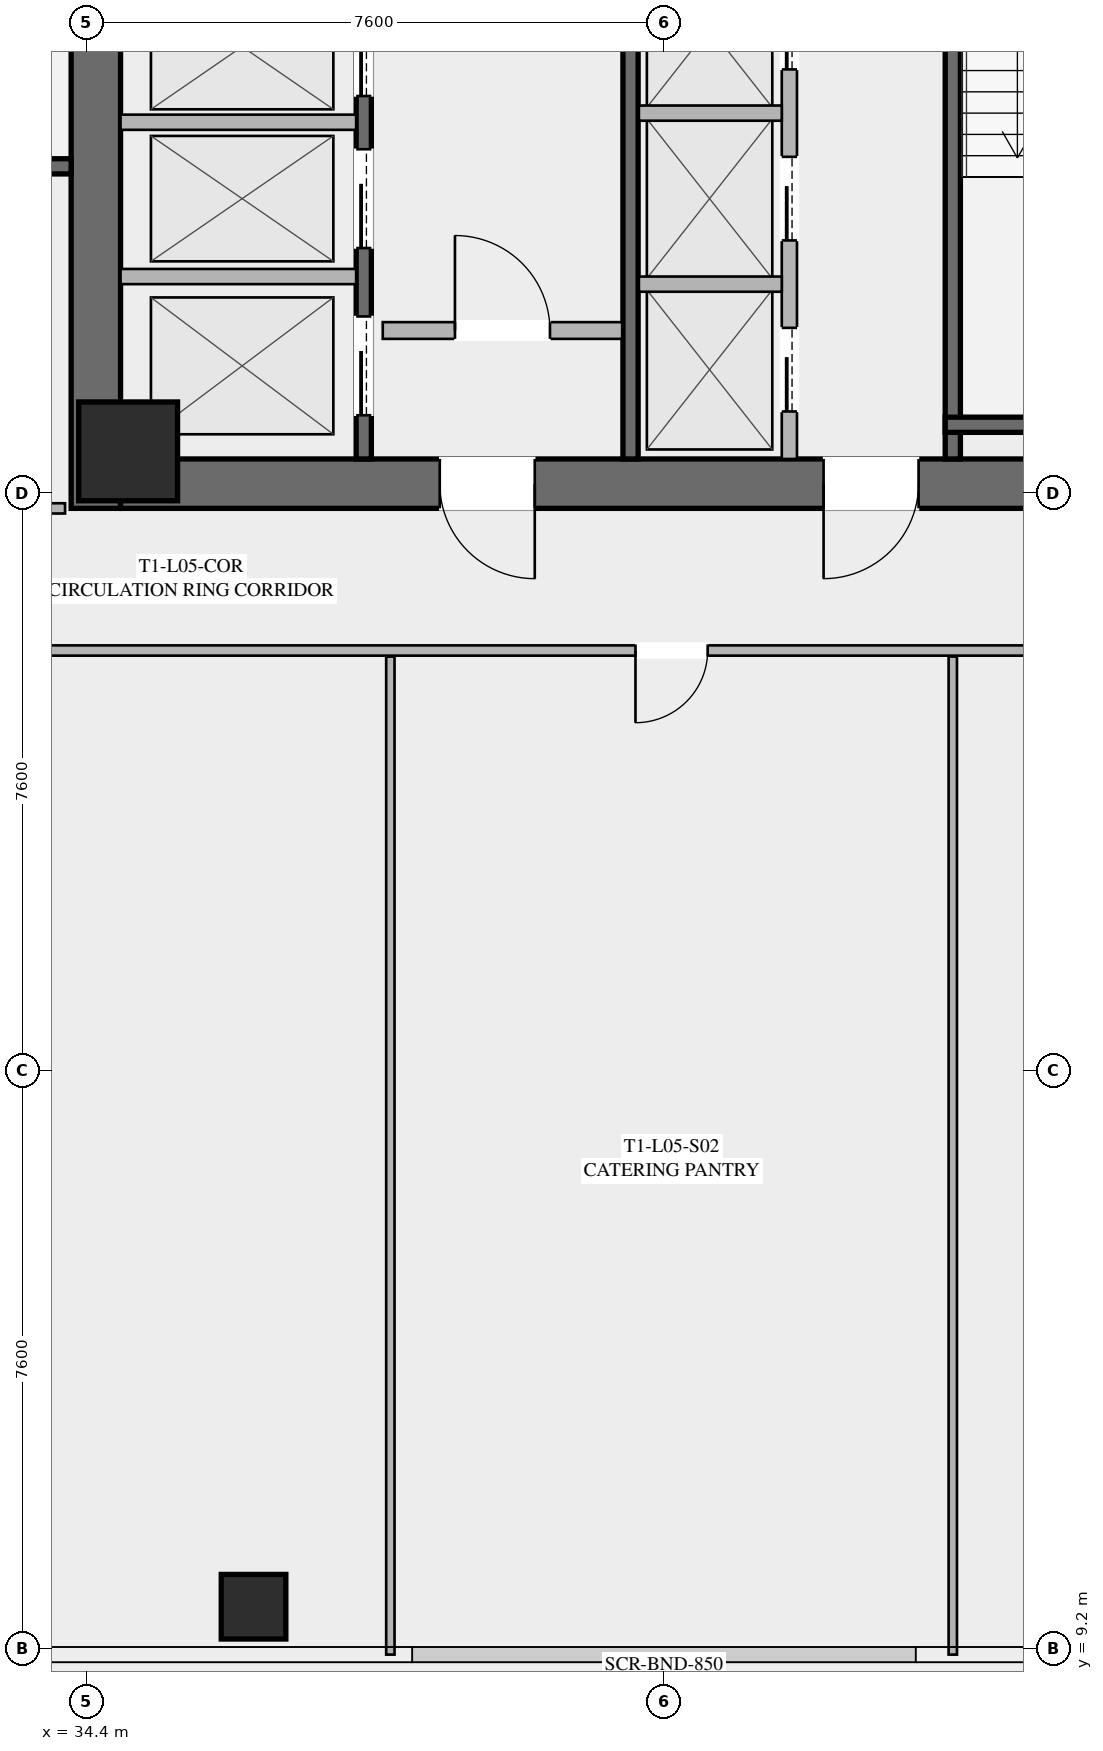
"""IFC4 building model, lengths in metres.
Left out: names, types, materials, properties, quantities, classifications, styles, units other than length and angle.
Written with IfcOpenShell. Run it as: python <this file> out.ifc"""

import sys

from ifc_helpers import new_model, si_unit, direction, frame, frame_2d, origin, origin_2d, place, context, subcontext, project, spatial, rectangle, hollow_rectangle, extrude, element, fill, save


model = new_model("IFC4")
c1 = context("Model", 3, precision=1e-05, world=origin(), true_north=direction((0.0, 1.0)))
c2 = subcontext(c1, "Body", "Model", "MODEL_VIEW")
j1 = project(units=[si_unit("LENGTHUNIT", "METRE"), si_unit("PLANEANGLEUNIT", "RADIAN")], contexts=[c1])
p1 = place(None, origin())
s1 = spatial("IfcSite", under=j1, at=p1, CompositionType="ELEMENT")
p2 = place(p1, origin())
s2 = spatial("IfcBuilding", under=s1, at=p2, CompositionType="ELEMENT")
p3 = place(p2, frame((0.0, 0.0, 24.6)))
s3 = spatial("IfcBuildingStorey", under=s2, at=p3, CompositionType="ELEMENT", Elevation=24.6)
p4 = place(p3, frame((34.525, 24.2, 0.0), z_axis=(0.0, 0.0, 1.0), x_axis=(0.0, 1.0, 0.0)))
e1 = element("IfcWall", 1, at=p4, inside=s3, PredefinedType="SHEAR", context=c2, shape_type="SweptSolid", body=[
    extrude(rectangle(XDim=15.6, YDim=0.65, at=frame_2d((7.8, 0.0))), origin(), (0.0, 0.0, 1.0), 3.55),
])
p5 = place(p3, frame((49.15, 24.525, 0.0), z_axis=(0.0, 0.0, 1.0), x_axis=(-1.0, 0.0, 0.0)))
e2 = element("IfcWall", 2, at=p5, inside=s3, PredefinedType="SHEAR", context=c2, shape_type="SweptSolid", body=[
    extrude(rectangle(XDim=14.3, YDim=0.65, at=frame_2d((7.15, 0.0))), origin(), (0.0, 0.0, 1.0), 3.55),
])
p6 = place(p5, frame((8.85, 0.0, 0.0)))
e3 = element("IfcOpeningElement", 3, at=p6, cuts=e2, PredefinedType="OPENING", context=c2, shape_type="SweptSolid", body=[
    extrude(rectangle(XDim=1.25, YDim=2.25, at=frame_2d((0.625, 1.125))), frame((0.0, 0.335, 0.0), z_axis=(0.0, -1.0, 0.0), x_axis=(1.0, 0.0, 0.0)), (0.0, 0.0, 1.0), 0.67),
])
p7 = place(p5, frame((3.8, 0.0, 0.0)))
e4 = element("IfcOpeningElement", 4, at=p7, cuts=e2, PredefinedType="OPENING", context=c2, shape_type="SweptSolid", body=[
    extrude(rectangle(XDim=1.25, YDim=2.25, at=frame_2d((0.625, 1.125))), frame((0.0, 0.335, 0.0), z_axis=(0.0, -1.0, 0.0), x_axis=(1.0, 0.0, 0.0)), (0.0, 0.0, 1.0), 0.67),
])
p8 = place(p3, frame((34.95, 24.95, 0.0), z_axis=(0.0, 0.0, 1.0), x_axis=(1.0, 0.0, 0.0)))
e5 = element("IfcColumn", 5, at=p8, inside=s3, PredefinedType="COLUMN", context=c2, shape_type="SweptSolid", body=[
    extrude(hollow_rectangle(XDim=1.3, YDim=1.3, WallThickness=0.05, at=origin_2d()), origin(), (0.0, 0.0, 1.0), 3.35),
])
p9 = place(p3, frame((36.6, 9.75, 0.0), z_axis=(0.0, 0.0, 1.0), x_axis=(1.0, 0.0, 0.0)))
e6 = element("IfcColumn", 6, at=p9, inside=s3, PredefinedType="COLUMN", context=c2, shape_type="SweptSolid", body=[
    extrude(hollow_rectangle(XDim=0.85, YDim=0.85, WallThickness=0.035, at=origin_2d()), origin(), (0.0, 0.0, 1.0), 3.35),
])
p10 = place(p3, frame((45.8, 32.8, 0.0), z_axis=(0.0, 0.0, 1.0), x_axis=(0.0, -1.0, 0.0)))
e7 = element("IfcWall", 7, at=p10, inside=s3, PredefinedType="SHEAR", context=c2, shape_type="SweptSolid", body=[
    extrude(rectangle(XDim=7.95, YDim=0.2, at=frame_2d((3.975, 0.0))), origin(), (0.0, 0.0, 1.0), 3.35),
])
p11 = place(p10, frame((0.45, 0.0, 0.0)))
e8 = element("IfcOpeningElement", 8, at=p11, cuts=e7, PredefinedType="OPENING", context=c2, shape_type="SweptSolid", body=[
    extrude(rectangle(XDim=1.15, YDim=2.2, at=frame_2d((0.575, 1.1))), frame((0.0, 0.11, 0.0), z_axis=(0.0, -1.0, 0.0), x_axis=(1.0, 0.0, 0.0)), (0.0, 0.0, 1.0), 0.22),
])
p12 = place(p3, frame((45.7, 25.3, 0.0), z_axis=(0.0, 0.0, 1.0), x_axis=(1.0, 0.0, 0.0)))
e9 = element("IfcWall", 9, at=p12, inside=s3, PredefinedType="SHEAR", context=c2, shape_type="SweptSolid", body=[
    extrude(rectangle(XDim=3.45, YDim=0.2, at=frame_2d((1.725, 0.0))), origin(), (0.0, 0.0, 1.0), 3.35),
])
p13 = place(p3, frame((41.56, 24.85, 0.0), z_axis=(0.0, 0.0, 1.0), x_axis=(0.0, 1.0, 0.0)))
e10 = element("IfcWall", 10, at=p13, inside=s3, PredefinedType="SHEAR", context=c2, shape_type="SweptSolid", body=[
    extrude(rectangle(XDim=14.3, YDim=0.2, at=frame_2d((7.15, 0.0))), origin(), (0.0, 0.0, 1.0), 3.35),
])
p14 = place(p3, frame((38.3, 26.54, 0.0), z_axis=(0.0, 0.0, 1.0), x_axis=(1.0, 0.0, 0.0)))
e11 = element("IfcWall", 11, at=p14, inside=s3, PredefinedType="SOLIDWALL", context=c2, shape_type="SweptSolid", body=[
    extrude(rectangle(XDim=3.15, YDim=0.22, at=frame_2d((1.575, 0.0))), origin(), (0.0, 0.0, 1.0), 2.703),
])
p15 = place(p14, frame((0.95, 0.0, 0.0)))
e12 = element("IfcOpeningElement", 12, at=p15, cuts=e11, PredefinedType="OPENING", context=c2, shape_type="SweptSolid", body=[
    extrude(rectangle(XDim=1.25, YDim=2.25, at=frame_2d((0.625, 1.125))), frame((0.0, 0.12, 0.0), z_axis=(0.0, -1.0, 0.0), x_axis=(1.0, 0.0, 0.0)), (0.0, 0.0, 1.0), 0.24),
])
p16 = place(p3, frame((38.05, 24.85, 0.0), z_axis=(0.0, 0.0, 1.0), x_axis=(0.0, 1.0, 0.0)))
e13 = element("IfcWall", 13, at=p16, inside=s3, PredefinedType="SHEAR", context=c2, shape_type="SweptSolid", body=[
    extrude(rectangle(XDim=6.35, YDim=0.2, at=frame_2d((3.175, 0.0))), origin(), (0.0, 0.0, 1.0), 3.35),
])
p17 = place(p16, frame((4.775, 0.0, 0.0)))
e14 = element("IfcOpeningElement", 14, at=p17, cuts=e13, PredefinedType="OPENING", context=c2, shape_type="SweptSolid", body=[
    extrude(rectangle(XDim=1.3, YDim=2.25, at=frame_2d((0.65, 1.125))), frame((0.0, 0.11, 0.0), z_axis=(0.0, -1.0, 0.0), x_axis=(1.0, 0.0, 0.0)), (0.0, 0.0, 1.0), 0.22),
])
p18 = place(p16, frame((2.775, 0.0, 0.0)))
e15 = element("IfcOpeningElement", 15, at=p18, cuts=e13, PredefinedType="OPENING", context=c2, shape_type="SweptSolid", body=[
    extrude(rectangle(XDim=1.3, YDim=2.25, at=frame_2d((0.65, 1.125))), frame((0.0, 0.11, 0.0), z_axis=(0.0, -1.0, 0.0), x_axis=(1.0, 0.0, 0.0)), (0.0, 0.0, 1.0), 0.22),
])
p19 = place(p16, frame((0.575, 0.0, 0.0)))
e16 = element("IfcOpeningElement", 16, at=p19, cuts=e13, PredefinedType="OPENING", context=c2, shape_type="SweptSolid", body=[
    extrude(rectangle(XDim=1.3, YDim=2.25, at=frame_2d((0.65, 1.125))), frame((0.0, 0.11, 0.0), z_axis=(0.0, -1.0, 0.0), x_axis=(1.0, 0.0, 0.0)), (0.0, 0.0, 1.0), 0.22),
])
for number, where, z_axis, x_axis in (
    (17, (34.85, 27.25, 0.0), (0.0, 0.0, 1.0), (1.0, 0.0, 0.0)),
    (18, (34.85, 29.28, 0.0), (0.0, 0.0, 1.0), (1.0, 0.0, 0.0)),
):
    element("IfcWall", number, at=place(p3, frame(where, z_axis=z_axis, x_axis=x_axis)), inside=s3, PredefinedType="SOLIDWALL", context=c2, shape_type="SweptSolid", body=[
        extrude(rectangle(XDim=3.1, YDim=0.2, at=frame_2d((1.55, 0.0))), origin(), (0.0, 0.0, 1.0), 3.35),
    ])
p20 = place(p3, frame((43.65, 24.85, 0.0), z_axis=(0.0, 0.0, 1.0), x_axis=(0.0, 1.0, 0.0)))
e19 = element("IfcWall", 19, at=p20, inside=s3, PredefinedType="SOLIDWALL", context=c2, shape_type="SweptSolid", body=[
    extrude(rectangle(XDim=6.8, YDim=0.2, at=frame_2d((3.4, 0.0))), origin(), (0.0, 0.0, 1.0), 3.35),
])
p21 = place(p20, frame((0.625, 0.0, 0.0)))
e20 = element("IfcOpeningElement", 20, at=p21, cuts=e19, PredefinedType="OPENING", context=c2, shape_type="SweptSolid", body=[
    extrude(rectangle(XDim=1.1, YDim=2.2, at=frame_2d((0.55, 1.1))), frame((0.0, 0.11, 0.0), z_axis=(0.0, -1.0, 0.0), x_axis=(1.0, 0.0, 0.0)), (0.0, 0.0, 1.0), 0.22),
])
p22 = place(p20, frame((2.875, 0.0, 0.0)))
e21 = element("IfcOpeningElement", 21, at=p22, cuts=e19, PredefinedType="OPENING", context=c2, shape_type="SweptSolid", body=[
    extrude(rectangle(XDim=1.1, YDim=2.2, at=frame_2d((0.55, 1.1))), frame((0.0, 0.11, 0.0), z_axis=(0.0, -1.0, 0.0), x_axis=(1.0, 0.0, 0.0)), (0.0, 0.0, 1.0), 0.22),
])
p23 = place(p20, frame((5.125, 0.0, 0.0)))
e22 = element("IfcOpeningElement", 22, at=p23, cuts=e19, PredefinedType="OPENING", context=c2, shape_type="SweptSolid", body=[
    extrude(rectangle(XDim=1.1, YDim=2.2, at=frame_2d((0.55, 1.1))), frame((0.0, 0.11, 0.0), z_axis=(0.0, -1.0, 0.0), x_axis=(1.0, 0.0, 0.0)), (0.0, 0.0, 1.0), 0.22),
])
for number, where, z_axis, x_axis in (
    (23, (41.67, 27.15, 0.0), (0.0, 0.0, 1.0), (1.0, 0.0, 0.0)),
    (24, (41.67, 29.4, 0.0), (0.0, 0.0, 1.0), (1.0, 0.0, 0.0)),
):
    element("IfcWall", number, at=place(p3, frame(where, z_axis=z_axis, x_axis=x_axis)), inside=s3, PredefinedType="SOLIDWALL", context=c2, shape_type="SweptSolid", body=[
        extrude(rectangle(XDim=1.88, YDim=0.2, at=frame_2d((0.94, 0.0))), origin(), (0.0, 0.0, 1.0), 3.35),
    ])
p24 = place(p3, frame((30.8, 28.7, 0.0), z_axis=(0.0, 0.0, 1.0), x_axis=(1.0, 0.0, 0.0)))
e25 = element("IfcWall", 25, at=p24, inside=s3, PredefinedType="SHEAR", context=c2, shape_type="SweptSolid", body=[
    extrude(rectangle(XDim=3.4, YDim=0.2, at=frame_2d((1.7, 0.0))), origin(), (0.0, 0.0, 1.0), 3.35),
])
p25 = place(p3, frame((51.35, 22.33, 0.0), z_axis=(0.0, 0.0, 1.0), x_axis=(-1.0, 0.0, 0.0)))
e26 = element("IfcWall", 26, at=p25, inside=s3, PredefinedType="PARTITIONING", context=c2, shape_type="SweptSolid", body=[
    extrude(rectangle(XDim=29.0, YDim=0.135, at=frame_2d((14.5, 0.0))), origin(), (0.0, 0.0, 1.0), 2.703),
])
p26 = place(p25, frame((27.67, 0.0, 0.0)))
e27 = element("IfcOpeningElement", 27, at=p26, cuts=e26, PredefinedType="OPENING", context=c2, shape_type="SweptSolid", body=[
    extrude(rectangle(XDim=0.95, YDim=2.05, at=frame_2d((0.475, 1.025))), frame((0.0, 0.077, 0.0), z_axis=(0.0, -1.0, 0.0), x_axis=(1.0, 0.0, 0.0)), (0.0, 0.0, 1.0), 0.155),
])
p27 = place(p25, frame((8.775, 0.0, 0.0)))
e28 = element("IfcOpeningElement", 28, at=p27, cuts=e26, PredefinedType="OPENING", context=c2, shape_type="SweptSolid", body=[
    extrude(rectangle(XDim=0.95, YDim=2.05, at=frame_2d((0.475, 1.025))), frame((0.0, 0.077, 0.0), z_axis=(0.0, -1.0, 0.0), x_axis=(1.0, 0.0, 0.0)), (0.0, 0.0, 1.0), 0.155),
])
p28 = place(p25, frame((0.38, 0.0, 0.0)))
e29 = element("IfcOpeningElement", 29, at=p28, cuts=e26, PredefinedType="OPENING", context=c2, shape_type="SweptSolid", body=[
    extrude(rectangle(XDim=0.95, YDim=2.05, at=frame_2d((0.475, 1.025))), frame((0.0, 0.077, 0.0), z_axis=(0.0, -1.0, 0.0), x_axis=(1.0, 0.0, 0.0)), (0.0, 0.0, 1.0), 0.155),
])
for number, where, z_axis, x_axis in (
    (30, (38.4, 9.12, 0.0), (0.0, 0.0, 1.0), (0.0, 1.0, 0.0)),
    (31, (45.8, 9.12, 0.0), (0.0, 0.0, 1.0), (0.0, 1.0, 0.0)),
):
    element("IfcWall", number, at=place(p3, frame(where, z_axis=z_axis, x_axis=x_axis)), inside=s3, PredefinedType="PARTITIONING", context=c2, shape_type="SweptSolid", body=[
        extrude(rectangle(XDim=13.13, YDim=0.11, at=frame_2d((6.565, 0.0))), origin(), (0.0, 0.0, 1.0), 2.703),
    ])
p29 = place(p3, frame((19.12, 24.2, 0.0), z_axis=(0.0, 0.0, 1.0), x_axis=(1.0, 0.0, 0.0)))
e32 = element("IfcWall", 32, at=p29, inside=s3, PredefinedType="PARTITIONING", context=c2, shape_type="SweptSolid", body=[
    extrude(rectangle(XDim=15.0, YDim=0.135, at=frame_2d((7.5, 0.0))), origin(), (0.0, 0.0, 1.0), 2.703),
])
p30 = place(p29, frame((12.005, 0.0, 0.0)))
e33 = element("IfcOpeningElement", 33, at=p30, cuts=e32, PredefinedType="OPENING", context=c2, shape_type="SweptSolid", body=[
    extrude(rectangle(XDim=0.95, YDim=2.05, at=frame_2d((0.475, 1.025))), frame((0.0, 0.077, 0.0), z_axis=(0.0, -1.0, 0.0), x_axis=(1.0, 0.0, 0.0)), (0.0, 0.0, 1.0), 0.155),
])
p31 = place(p6, origin())
e34 = element("IfcDoor", 34, at=p31, inside=s3, OperationType="SINGLE_SWING_LEFT", PredefinedType="DOOR", context=c2, shape_type="SweptSolid", body=[
    extrude(rectangle(XDim=1.25, YDim=2.25, at=frame_2d((0.625, 1.125))), frame((0.0, 0.025, 0.0), z_axis=(0.0, -1.0, 0.0), x_axis=(1.0, 0.0, 0.0)), (0.0, 0.0, 1.0), 0.05),
])
fill(e3, e34)
p32 = place(p7, origin())
e35 = element("IfcDoor", 35, at=p32, inside=s3, OperationType="SINGLE_SWING_RIGHT", PredefinedType="DOOR", context=c2, shape_type="SweptSolid", body=[
    extrude(rectangle(XDim=1.25, YDim=2.25, at=frame_2d((0.625, 1.125))), frame((0.0, 0.025, 0.0), z_axis=(0.0, -1.0, 0.0), x_axis=(1.0, 0.0, 0.0)), (0.0, 0.0, 1.0), 0.05),
])
fill(e4, e35)
p33 = place(p15, origin())
e36 = element("IfcDoor", 36, at=p33, inside=s3, OperationType="SINGLE_SWING_LEFT", PredefinedType="DOOR", context=c2, shape_type="SweptSolid", body=[
    extrude(rectangle(XDim=1.25, YDim=2.25, at=frame_2d((0.625, 1.125))), frame((0.0, 0.025, 0.0), z_axis=(0.0, -1.0, 0.0), x_axis=(1.0, 0.0, 0.0)), (0.0, 0.0, 1.0), 0.05),
])
fill(e12, e36)
p34 = place(p27, origin())
e37 = element("IfcDoor", 37, at=p34, inside=s3, OperationType="SINGLE_SWING_RIGHT", PredefinedType="DOOR", context=c2, shape_type="SweptSolid", body=[
    extrude(rectangle(XDim=0.95, YDim=2.05, at=frame_2d((0.475, 1.025))), frame((0.0, 0.025, 0.0), z_axis=(0.0, -1.0, 0.0), x_axis=(1.0, 0.0, 0.0)), (0.0, 0.0, 1.0), 0.05),
])
fill(e28, e37)
p35 = place(p17, origin())
e38 = element("IfcDoor", 38, at=p35, inside=s3, OperationType="SLIDING_TO_LEFT", PredefinedType="DOOR", context=c2, shape_type="SweptSolid", body=[
    extrude(rectangle(XDim=1.3, YDim=2.25, at=frame_2d((0.65, 1.125))), frame((0.0, 0.025, 0.0), z_axis=(0.0, -1.0, 0.0), x_axis=(1.0, 0.0, 0.0)), (0.0, 0.0, 1.0), 0.05),
])
fill(e14, e38)
p36 = place(p18, origin())
e39 = element("IfcDoor", 39, at=p36, inside=s3, OperationType="SLIDING_TO_LEFT", PredefinedType="DOOR", context=c2, shape_type="SweptSolid", body=[
    extrude(rectangle(XDim=1.3, YDim=2.25, at=frame_2d((0.65, 1.125))), frame((0.0, 0.025, 0.0), z_axis=(0.0, -1.0, 0.0), x_axis=(1.0, 0.0, 0.0)), (0.0, 0.0, 1.0), 0.05),
])
fill(e15, e39)
p37 = place(p19, origin())
e40 = element("IfcDoor", 40, at=p37, inside=s3, OperationType="SLIDING_TO_LEFT", PredefinedType="DOOR", context=c2, shape_type="SweptSolid", body=[
    extrude(rectangle(XDim=1.3, YDim=2.25, at=frame_2d((0.65, 1.125))), frame((0.0, 0.025, 0.0), z_axis=(0.0, -1.0, 0.0), x_axis=(1.0, 0.0, 0.0)), (0.0, 0.0, 1.0), 0.05),
])
fill(e16, e40)
p38 = place(p21, origin())
e41 = element("IfcDoor", 41, at=p38, inside=s3, OperationType="SLIDING_TO_LEFT", PredefinedType="DOOR", context=c2, shape_type="SweptSolid", body=[
    extrude(rectangle(XDim=1.1, YDim=2.2, at=frame_2d((0.55, 1.1))), frame((0.0, 0.025, 0.0), z_axis=(0.0, -1.0, 0.0), x_axis=(1.0, 0.0, 0.0)), (0.0, 0.0, 1.0), 0.05),
])
fill(e20, e41)
p39 = place(p22, origin())
e42 = element("IfcDoor", 42, at=p39, inside=s3, OperationType="SLIDING_TO_LEFT", PredefinedType="DOOR", context=c2, shape_type="SweptSolid", body=[
    extrude(rectangle(XDim=1.1, YDim=2.2, at=frame_2d((0.55, 1.1))), frame((0.0, 0.025, 0.0), z_axis=(0.0, -1.0, 0.0), x_axis=(1.0, 0.0, 0.0)), (0.0, 0.0, 1.0), 0.05),
])
fill(e21, e42)
p40 = place(p23, origin())
e43 = element("IfcDoor", 43, at=p40, inside=s3, OperationType="SLIDING_TO_LEFT", PredefinedType="DOOR", context=c2, shape_type="SweptSolid", body=[
    extrude(rectangle(XDim=1.1, YDim=2.2, at=frame_2d((0.55, 1.1))), frame((0.0, 0.025, 0.0), z_axis=(0.0, -1.0, 0.0), x_axis=(1.0, 0.0, 0.0)), (0.0, 0.0, 1.0), 0.05),
])
fill(e22, e43)
save(model, sys.argv[1])
